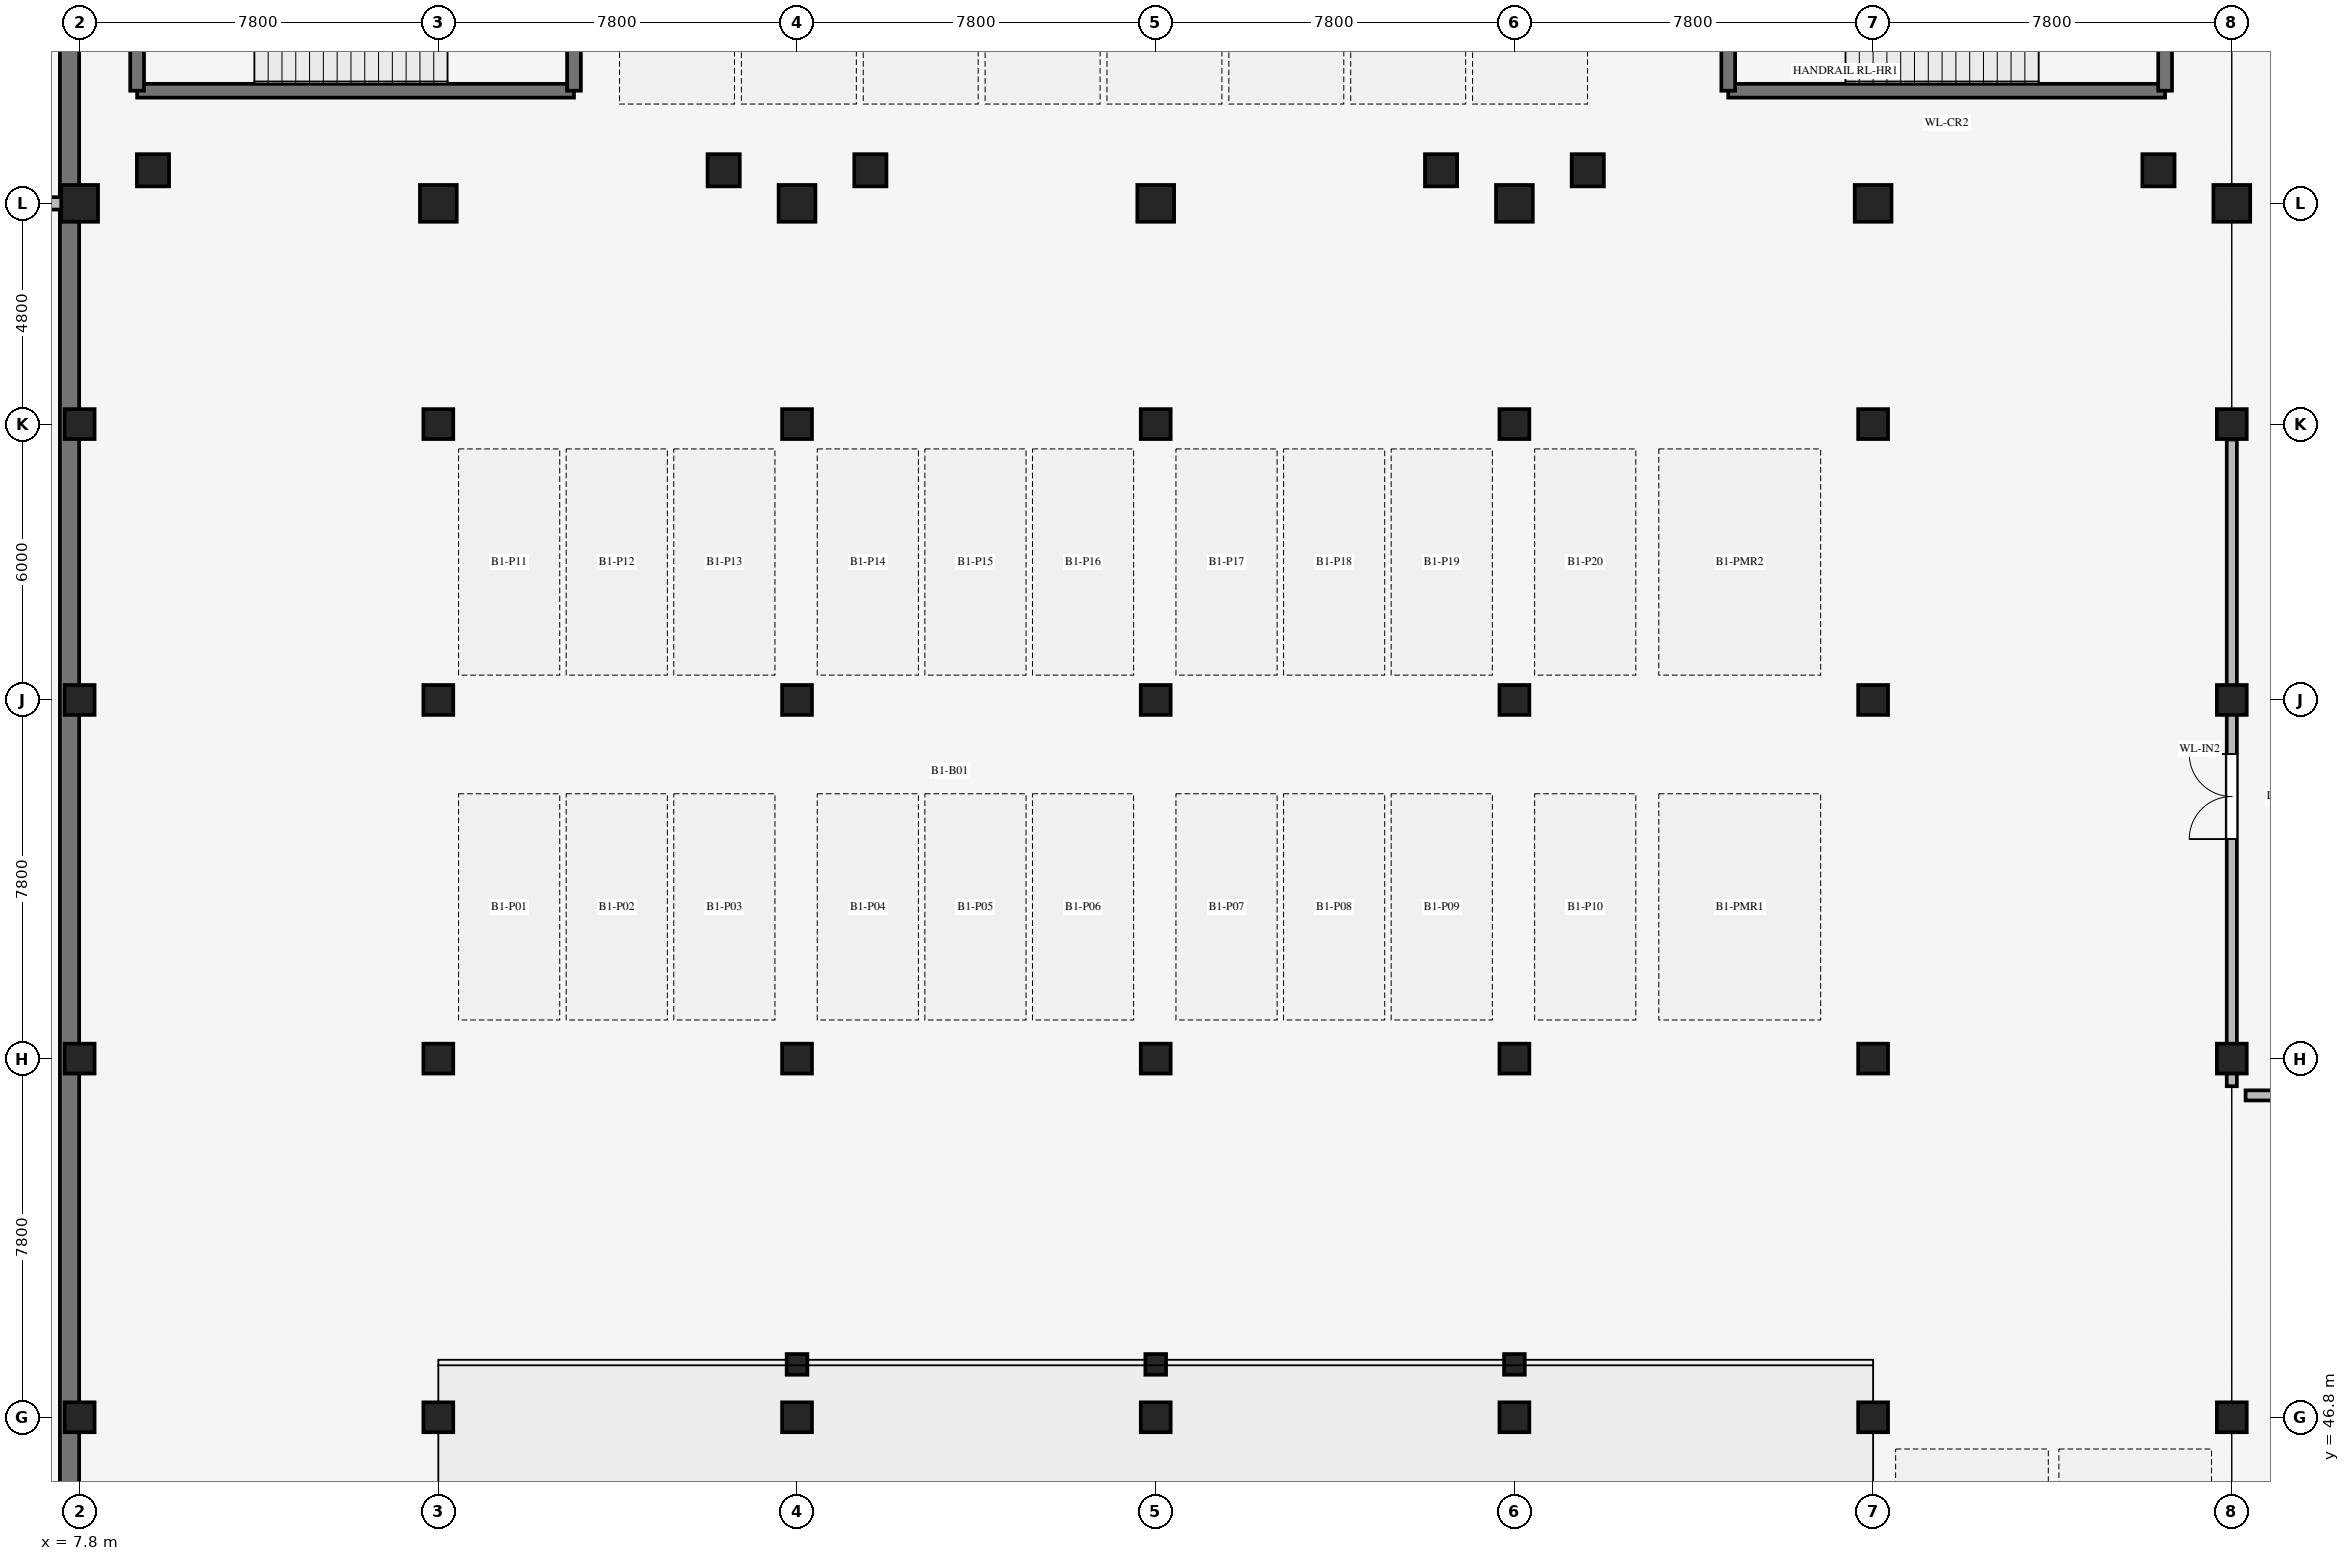
"""IFC4 building model, lengths in metres.
Left out: names, types, materials, properties, quantities, classifications, styles, units other than length and angle.
Written with IfcOpenShell. Run it as: python <this file> out.ifc"""

import sys

from ifc_helpers import new_model, si_unit, direction, frame, frame_2d, origin, origin_2d, place, context, subcontext, project, spatial, rectangle, extrude, element, fill, save


model = new_model("IFC4")
c1 = context("Model", 3, precision=1e-05, world=origin(), true_north=direction((0.0, 1.0)))
c2 = subcontext(c1, "Body", "Model", "MODEL_VIEW")
j1 = project(units=[si_unit("LENGTHUNIT", "METRE"), si_unit("PLANEANGLEUNIT", "RADIAN")], contexts=[c1])
p1 = place(None, origin())
s1 = spatial("IfcSite", under=j1, at=p1, CompositionType="ELEMENT")
p2 = place(p1, origin())
s2 = spatial("IfcBuilding", under=s1, at=p2, CompositionType="ELEMENT")
p3 = place(p2, frame((0.0, 0.0, -4.8)))
s3 = spatial("IfcBuildingStorey", under=s2, at=p3, CompositionType="ELEMENT", Elevation=-4.8)
for number, where, z_axis, x_axis in (
    (1, (7.8, 46.8, 0.0), (0.0, 0.0, 1.0), (1.0, 0.0, 0.0)),
    (2, (7.8, 54.6, 0.0), (0.0, 0.0, 1.0), (1.0, 0.0, 0.0)),
    (3, (7.8, 62.4, 0.0), (0.0, 0.0, 1.0), (1.0, 0.0, 0.0)),
    (4, (7.8, 68.4, 0.0), (0.0, 0.0, 1.0), (1.0, 0.0, 0.0)),
):
    element("IfcColumn", number, at=place(p3, frame(where, z_axis=z_axis, x_axis=x_axis)), inside=s3, PredefinedType="COLUMN", context=c2, shape_type="SweptSolid", body=[
        extrude(rectangle(XDim=0.65, YDim=0.65, at=origin_2d()), origin(), (0.0, 0.0, 1.0), 4.8),
    ])
p4 = place(p3, frame((7.8, 73.2, 0.0), z_axis=(0.0, 0.0, 1.0), x_axis=(1.0, 0.0, 0.0)))
e5 = element("IfcColumn", 5, at=p4, inside=s3, PredefinedType="COLUMN", context=c2, shape_type="SweptSolid", body=[
    extrude(rectangle(XDim=0.8, YDim=0.8, at=origin_2d()), origin(), (0.0, 0.0, 1.0), 4.8),
])
p5 = place(p3, frame((9.395, 73.92, 0.0), z_axis=(0.0, 0.0, 1.0), x_axis=(1.0, 0.0, 0.0)))
e6 = element("IfcColumn", 6, at=p5, inside=s3, PredefinedType="COLUMN", context=c2, shape_type="SweptSolid", body=[
    extrude(rectangle(XDim=0.7, YDim=0.7, at=origin_2d()), origin(), (0.0, 0.0, 1.0), 4.755),
])
for number, where, z_axis, x_axis in (
    (7, (15.6, 46.8, 0.0), (0.0, 0.0, 1.0), (1.0, 0.0, 0.0)),
    (8, (15.6, 54.6, 0.0), (0.0, 0.0, 1.0), (1.0, 0.0, 0.0)),
    (9, (15.6, 62.4, 0.0), (0.0, 0.0, 1.0), (1.0, 0.0, 0.0)),
    (10, (15.6, 68.4, 0.0), (0.0, 0.0, 1.0), (1.0, 0.0, 0.0)),
):
    element("IfcColumn", number, at=place(p3, frame(where, z_axis=z_axis, x_axis=x_axis)), inside=s3, PredefinedType="COLUMN", context=c2, shape_type="SweptSolid", body=[
        extrude(rectangle(XDim=0.65, YDim=0.65, at=origin_2d()), origin(), (0.0, 0.0, 1.0), 4.8),
    ])
p6 = place(p3, frame((15.6, 73.2, 0.0), z_axis=(0.0, 0.0, 1.0), x_axis=(1.0, 0.0, 0.0)))
e11 = element("IfcColumn", 11, at=p6, inside=s3, PredefinedType="COLUMN", context=c2, shape_type="SweptSolid", body=[
    extrude(rectangle(XDim=0.8, YDim=0.8, at=origin_2d()), origin(), (0.0, 0.0, 1.0), 4.8),
])
for number, where, z_axis, x_axis in (
    (12, (23.4, 46.8, 0.0), (0.0, 0.0, 1.0), (1.0, 0.0, 0.0)),
    (13, (23.4, 54.6, 0.0), (0.0, 0.0, 1.0), (1.0, 0.0, 0.0)),
    (14, (23.4, 62.4, 0.0), (0.0, 0.0, 1.0), (1.0, 0.0, 0.0)),
    (15, (23.4, 68.4, 0.0), (0.0, 0.0, 1.0), (1.0, 0.0, 0.0)),
):
    element("IfcColumn", number, at=place(p3, frame(where, z_axis=z_axis, x_axis=x_axis)), inside=s3, PredefinedType="COLUMN", context=c2, shape_type="SweptSolid", body=[
        extrude(rectangle(XDim=0.65, YDim=0.65, at=origin_2d()), origin(), (0.0, 0.0, 1.0), 4.8),
    ])
p7 = place(p3, frame((23.4, 73.2, 0.0), z_axis=(0.0, 0.0, 1.0), x_axis=(1.0, 0.0, 0.0)))
e16 = element("IfcColumn", 16, at=p7, inside=s3, PredefinedType="COLUMN", context=c2, shape_type="SweptSolid", body=[
    extrude(rectangle(XDim=0.8, YDim=0.8, at=origin_2d()), origin(), (0.0, 0.0, 1.0), 4.8),
])
for number, where, z_axis, x_axis in (
    (17, (21.805, 73.92, 0.0), (0.0, 0.0, 1.0), (1.0, 0.0, 0.0)),
    (18, (24.995, 73.92, 0.0), (0.0, 0.0, 1.0), (1.0, 0.0, 0.0)),
):
    element("IfcColumn", number, at=place(p3, frame(where, z_axis=z_axis, x_axis=x_axis)), inside=s3, PredefinedType="COLUMN", context=c2, shape_type="SweptSolid", body=[
        extrude(rectangle(XDim=0.7, YDim=0.7, at=origin_2d()), origin(), (0.0, 0.0, 1.0), 4.755),
    ])
for number, where, z_axis, x_axis in (
    (19, (31.2, 46.8, 0.0), (0.0, 0.0, 1.0), (1.0, 0.0, 0.0)),
    (20, (31.2, 54.6, 0.0), (0.0, 0.0, 1.0), (1.0, 0.0, 0.0)),
    (21, (31.2, 62.4, 0.0), (0.0, 0.0, 1.0), (1.0, 0.0, 0.0)),
    (22, (31.2, 68.4, 0.0), (0.0, 0.0, 1.0), (1.0, 0.0, 0.0)),
):
    element("IfcColumn", number, at=place(p3, frame(where, z_axis=z_axis, x_axis=x_axis)), inside=s3, PredefinedType="COLUMN", context=c2, shape_type="SweptSolid", body=[
        extrude(rectangle(XDim=0.65, YDim=0.65, at=origin_2d()), origin(), (0.0, 0.0, 1.0), 4.8),
    ])
p8 = place(p3, frame((31.2, 73.2, 0.0), z_axis=(0.0, 0.0, 1.0), x_axis=(1.0, 0.0, 0.0)))
e23 = element("IfcColumn", 23, at=p8, inside=s3, PredefinedType="COLUMN", context=c2, shape_type="SweptSolid", body=[
    extrude(rectangle(XDim=0.8, YDim=0.8, at=origin_2d()), origin(), (0.0, 0.0, 1.0), 4.8),
])
for number, where, z_axis, x_axis in (
    (24, (39.0, 46.8, 0.0), (0.0, 0.0, 1.0), (1.0, 0.0, 0.0)),
    (25, (39.0, 54.6, 0.0), (0.0, 0.0, 1.0), (1.0, 0.0, 0.0)),
    (26, (39.0, 62.4, 0.0), (0.0, 0.0, 1.0), (1.0, 0.0, 0.0)),
    (27, (39.0, 68.4, 0.0), (0.0, 0.0, 1.0), (1.0, 0.0, 0.0)),
):
    element("IfcColumn", number, at=place(p3, frame(where, z_axis=z_axis, x_axis=x_axis)), inside=s3, PredefinedType="COLUMN", context=c2, shape_type="SweptSolid", body=[
        extrude(rectangle(XDim=0.65, YDim=0.65, at=origin_2d()), origin(), (0.0, 0.0, 1.0), 4.8),
    ])
p9 = place(p3, frame((39.0, 73.2, 0.0), z_axis=(0.0, 0.0, 1.0), x_axis=(1.0, 0.0, 0.0)))
e28 = element("IfcColumn", 28, at=p9, inside=s3, PredefinedType="COLUMN", context=c2, shape_type="SweptSolid", body=[
    extrude(rectangle(XDim=0.8, YDim=0.8, at=origin_2d()), origin(), (0.0, 0.0, 1.0), 4.8),
])
for number, where, z_axis, x_axis in (
    (29, (37.405, 73.92, 0.0), (0.0, 0.0, 1.0), (1.0, 0.0, 0.0)),
    (30, (40.595, 73.92, 0.0), (0.0, 0.0, 1.0), (1.0, 0.0, 0.0)),
):
    element("IfcColumn", number, at=place(p3, frame(where, z_axis=z_axis, x_axis=x_axis)), inside=s3, PredefinedType="COLUMN", context=c2, shape_type="SweptSolid", body=[
        extrude(rectangle(XDim=0.7, YDim=0.7, at=origin_2d()), origin(), (0.0, 0.0, 1.0), 4.755),
    ])
for number, where, z_axis, x_axis in (
    (31, (46.8, 46.8, 0.0), (0.0, 0.0, 1.0), (1.0, 0.0, 0.0)),
    (32, (46.8, 54.6, 0.0), (0.0, 0.0, 1.0), (1.0, 0.0, 0.0)),
    (33, (46.8, 62.4, 0.0), (0.0, 0.0, 1.0), (1.0, 0.0, 0.0)),
    (34, (46.8, 68.4, 0.0), (0.0, 0.0, 1.0), (1.0, 0.0, 0.0)),
):
    element("IfcColumn", number, at=place(p3, frame(where, z_axis=z_axis, x_axis=x_axis)), inside=s3, PredefinedType="COLUMN", context=c2, shape_type="SweptSolid", body=[
        extrude(rectangle(XDim=0.65, YDim=0.65, at=origin_2d()), origin(), (0.0, 0.0, 1.0), 4.8),
    ])
p10 = place(p3, frame((46.8, 73.2, 0.0), z_axis=(0.0, 0.0, 1.0), x_axis=(1.0, 0.0, 0.0)))
e35 = element("IfcColumn", 35, at=p10, inside=s3, PredefinedType="COLUMN", context=c2, shape_type="SweptSolid", body=[
    extrude(rectangle(XDim=0.8, YDim=0.8, at=origin_2d()), origin(), (0.0, 0.0, 1.0), 4.8),
])
for number, where, z_axis, x_axis in (
    (36, (54.6, 46.8, 0.0), (0.0, 0.0, 1.0), (1.0, 0.0, 0.0)),
    (37, (54.6, 54.6, 0.0), (0.0, 0.0, 1.0), (1.0, 0.0, 0.0)),
    (38, (54.6, 62.4, 0.0), (0.0, 0.0, 1.0), (1.0, 0.0, 0.0)),
    (39, (54.6, 68.4, 0.0), (0.0, 0.0, 1.0), (1.0, 0.0, 0.0)),
):
    element("IfcColumn", number, at=place(p3, frame(where, z_axis=z_axis, x_axis=x_axis)), inside=s3, PredefinedType="COLUMN", context=c2, shape_type="SweptSolid", body=[
        extrude(rectangle(XDim=0.65, YDim=0.65, at=origin_2d()), origin(), (0.0, 0.0, 1.0), 4.8),
    ])
p11 = place(p3, frame((54.6, 73.2, 0.0), z_axis=(0.0, 0.0, 1.0), x_axis=(1.0, 0.0, 0.0)))
e40 = element("IfcColumn", 40, at=p11, inside=s3, PredefinedType="COLUMN", context=c2, shape_type="SweptSolid", body=[
    extrude(rectangle(XDim=0.8, YDim=0.8, at=origin_2d()), origin(), (0.0, 0.0, 1.0), 4.8),
])
p12 = place(p3, frame((53.005, 73.92, 0.0), z_axis=(0.0, 0.0, 1.0), x_axis=(1.0, 0.0, 0.0)))
e41 = element("IfcColumn", 41, at=p12, inside=s3, PredefinedType="COLUMN", context=c2, shape_type="SweptSolid", body=[
    extrude(rectangle(XDim=0.7, YDim=0.7, at=origin_2d()), origin(), (0.0, 0.0, 1.0), 4.755),
])
p13 = place(p3, frame((7.58, 98.4, 0.0), z_axis=(0.0, 0.0, 1.0), x_axis=(0.0, -1.0, 0.0)))
e42 = element("IfcWall", 42, at=p13, inside=s3, PredefinedType="USERDEFINED", context=c2, shape_type="SweptSolid", body=[
    extrude(rectangle(XDim=98.4, YDim=0.42, at=frame_2d((49.2, 0.0))), origin(), (0.0, 0.0, 1.0), 4.78),
])
p14 = place(p3, frame((53.15, 75.65, 0.0), z_axis=(0.0, 0.0, 1.0), x_axis=(-1.0, 0.0, 0.0)))
e43 = element("IfcWall", 43, at=p14, inside=s3, PredefinedType="SHEAR", context=c2, shape_type="SweptSolid", body=[
    extrude(rectangle(XDim=9.5, YDim=0.3, at=frame_2d((4.75, 0.0))), origin(), (0.0, 0.0, 1.0), 4.8),
])
p15 = place(p3, frame((43.65, 75.65, 0.0), z_axis=(0.0, 0.0, 1.0), x_axis=(0.0, 1.0, 0.0)))
e44 = element("IfcWall", 44, at=p15, inside=s3, PredefinedType="SHEAR", context=c2, shape_type="SweptSolid", body=[
    extrude(rectangle(XDim=3.8, YDim=0.3, at=frame_2d((1.9, 0.0))), origin(), (0.0, 0.0, 1.0), 4.8),
])
p16 = place(p15, frame((1.15, 0.0, 0.0)))
e45 = element("IfcOpeningElement", 45, at=p16, cuts=e44, PredefinedType="OPENING", context=c2, shape_type="SweptSolid", body=[
    extrude(rectangle(XDim=1.65, YDim=2.2, at=frame_2d((0.825, 1.1))), frame((0.0, 0.16, 0.0), z_axis=(0.0, -1.0, 0.0), x_axis=(1.0, 0.0, 0.0)), (0.0, 0.0, 1.0), 0.32),
])
p17 = place(p3, frame((53.15, 75.65, 0.0), z_axis=(0.0, 0.0, 1.0), x_axis=(0.0, 1.0, 0.0)))
e46 = element("IfcWall", 46, at=p17, inside=s3, PredefinedType="SHEAR", context=c2, shape_type="SweptSolid", body=[
    extrude(rectangle(XDim=3.8, YDim=0.3, at=frame_2d((1.9, 0.0))), origin(), (0.0, 0.0, 1.0), 4.8),
])
p18 = place(p3, frame((18.55, 75.65, 0.0), z_axis=(0.0, 0.0, 1.0), x_axis=(-1.0, 0.0, 0.0)))
e47 = element("IfcWall", 47, at=p18, inside=s3, PredefinedType="SHEAR", context=c2, shape_type="SweptSolid", body=[
    extrude(rectangle(XDim=9.5, YDim=0.3, at=frame_2d((4.75, 0.0))), origin(), (0.0, 0.0, 1.0), 4.8),
])
p19 = place(p3, frame((9.05, 75.65, 0.0), z_axis=(0.0, 0.0, 1.0), x_axis=(0.0, 1.0, 0.0)))
e48 = element("IfcWall", 48, at=p19, inside=s3, PredefinedType="SHEAR", context=c2, shape_type="SweptSolid", body=[
    extrude(rectangle(XDim=3.8, YDim=0.3, at=frame_2d((1.9, 0.0))), origin(), (0.0, 0.0, 1.0), 4.8),
])
p20 = place(p19, frame((1.15, 0.0, 0.0)))
e49 = element("IfcOpeningElement", 49, at=p20, cuts=e48, PredefinedType="OPENING", context=c2, shape_type="SweptSolid", body=[
    extrude(rectangle(XDim=1.65, YDim=2.2, at=frame_2d((0.825, 1.1))), frame((0.0, 0.16, 0.0), z_axis=(0.0, -1.0, 0.0), x_axis=(1.0, 0.0, 0.0)), (0.0, 0.0, 1.0), 0.32),
])
p21 = place(p3, frame((18.55, 75.65, 0.0), z_axis=(0.0, 0.0, 1.0), x_axis=(0.0, 1.0, 0.0)))
e50 = element("IfcWall", 50, at=p21, inside=s3, PredefinedType="SHEAR", context=c2, shape_type="SweptSolid", body=[
    extrude(rectangle(XDim=3.8, YDim=0.3, at=frame_2d((1.9, 0.0))), origin(), (0.0, 0.0, 1.0), 4.8),
])
p22 = place(p3, frame((23.4, 47.95, 0.0), z_axis=(0.0, 0.0, 1.0), x_axis=(1.0, 0.0, 0.0)))
e51 = element("IfcColumn", 51, at=p22, inside=s3, PredefinedType="COLUMN", context=c2, shape_type="SweptSolid", body=[
    extrude(rectangle(XDim=0.45, YDim=0.45, at=origin_2d()), origin(), (0.0, 0.0, 1.0), 1.08),
])
p23 = place(p3, frame((31.2, 47.95, 0.0), z_axis=(0.0, 0.0, 1.0), x_axis=(1.0, 0.0, 0.0)))
e52 = element("IfcColumn", 52, at=p23, inside=s3, PredefinedType="COLUMN", context=c2, shape_type="SweptSolid", body=[
    extrude(rectangle(XDim=0.45, YDim=0.45, at=origin_2d()), origin(), (0.0, 0.0, 1.0), 2.2),
])
p24 = place(p3, frame((39.0, 47.95, 0.0), z_axis=(0.0, 0.0, 1.0), x_axis=(1.0, 0.0, 0.0)))
e53 = element("IfcColumn", 53, at=p24, inside=s3, PredefinedType="COLUMN", context=c2, shape_type="SweptSolid", body=[
    extrude(rectangle(XDim=0.45, YDim=0.45, at=origin_2d()), origin(), (0.0, 0.0, 1.0), 3.32),
])
p25 = place(p3, frame((7.8, 73.2, 0.0), z_axis=(0.0, 0.0, 1.0), x_axis=(-1.0, 0.0, 0.0)))
e54 = element("IfcWall", 54, at=p25, inside=s3, PredefinedType="STANDARD", context=c2, shape_type="SweptSolid", body=[
    extrude(rectangle(XDim=7.8, YDim=0.27, at=frame_2d((3.9, 0.0))), origin(), (0.0, 0.0, 1.0), 4.63),
])
p26 = place(p3, frame((54.9, 53.8, 0.0), z_axis=(0.0, 0.0, 1.0), x_axis=(1.0, 0.0, 0.0)))
e55 = element("IfcWall", 55, at=p26, inside=s3, PredefinedType="STANDARD", context=c2, shape_type="SweptSolid", body=[
    extrude(rectangle(XDim=24.5, YDim=0.22, at=frame_2d((12.25, 0.0))), origin(), (0.0, 0.0, 1.0), 3.1),
])
p27 = place(p26, frame((11.775, 0.0, 0.0)))
e56 = element("IfcOpeningElement", 56, at=p27, cuts=e55, PredefinedType="OPENING", context=c2, shape_type="SweptSolid", body=[
    extrude(rectangle(XDim=0.95, YDim=2.15, at=frame_2d((0.475, 1.075))), frame((0.0, 0.12, 0.0), z_axis=(0.0, -1.0, 0.0), x_axis=(1.0, 0.0, 0.0)), (0.0, 0.0, 1.0), 0.24),
])
p28 = place(p3, frame((54.6, 54.0, 0.0), z_axis=(0.0, 0.0, 1.0), x_axis=(0.0, 1.0, 0.0)))
e57 = element("IfcWall", 57, at=p28, inside=s3, PredefinedType="STANDARD", context=c2, shape_type="SweptSolid", body=[
    extrude(rectangle(XDim=14.065, YDim=0.22, at=frame_2d((7.032, 0.0))), origin(), (0.0, 0.0, 1.0), 3.1),
])
p29 = place(p28, frame((5.375, 0.0, 0.0)))
e58 = element("IfcOpeningElement", 58, at=p29, cuts=e57, PredefinedType="OPENING", context=c2, shape_type="SweptSolid", body=[
    extrude(rectangle(XDim=1.85, YDim=2.25, at=frame_2d((0.925, 1.125))), frame((0.0, 0.12, 0.0), z_axis=(0.0, -1.0, 0.0), x_axis=(1.0, 0.0, 0.0)), (0.0, 0.0, 1.0), 0.24),
])
p30 = place(p29, origin())
e59 = element("IfcDoor", 59, at=p30, inside=s3, OperationType="DOUBLE_DOOR_SINGLE_SWING", PredefinedType="DOOR", context=c2, shape_type="SweptSolid", body=[
    extrude(rectangle(XDim=1.85, YDim=2.25, at=frame_2d((0.925, 1.125))), frame((0.0, 0.025, 0.0), z_axis=(0.0, -1.0, 0.0), x_axis=(1.0, 0.0, 0.0)), (0.0, 0.0, 1.0), 0.05),
])
fill(e58, e59)
save(model, sys.argv[1])
